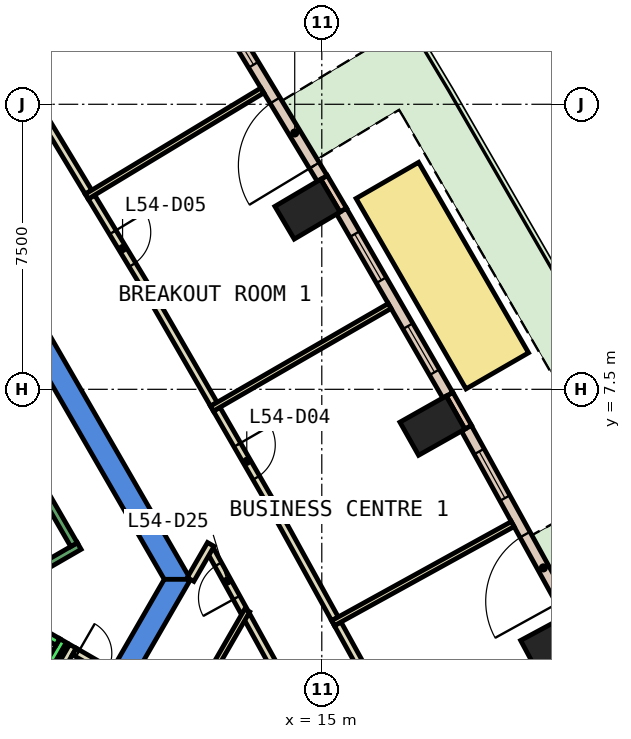
"""IFC4 building model, lengths in metres.
Left out: names, types, materials, properties, quantities, classifications, styles, units other than length and angle.
Written with IfcOpenShell. Run it as: python <this file> out.ifc"""

import sys

from ifc_helpers import new_model, si_unit, direction, frame, frame_2d, origin, origin_2d, place, context, subcontext, project, spatial, polyline, rectangle, outline, extrude, element, fill, save


model = new_model("IFC4")
c1 = context("Model", 3, precision=1e-05, world=origin(), true_north=direction((0.0, 1.0)))
c2 = subcontext(c1, "Body", "Model", "MODEL_VIEW")
j1 = project(units=[si_unit("LENGTHUNIT", "METRE"), si_unit("PLANEANGLEUNIT", "RADIAN")], contexts=[c1])
p1 = place(None, origin())
s1 = spatial("IfcSite", under=j1, at=p1, CompositionType="ELEMENT")
p2 = place(p1, origin())
s2 = spatial("IfcBuilding", under=s1, at=p2, CompositionType="ELEMENT")
p3 = place(p2, frame((0.0, 0.0, 241.4)))
s3 = spatial("IfcBuildingStorey", under=s2, at=p3, CompositionType="ELEMENT", Elevation=241.4)
for number, where, z_axis, x_axis in (
    (1, (21.086, 0.784, 0.0), (0.0, 0.0, 1.0), (-0.474, 0.881, 0.0)),
    (2, (17.911, 6.544, 0.0), (0.0, 0.0, 1.0), (-0.491, 0.871, 0.0)),
    (3, (14.623, 12.239, 0.0), (0.0, 0.0, 1.0), (-0.509, 0.861, 0.0)),
):
    element("IfcColumn", number, at=place(p3, frame(where, z_axis=z_axis, x_axis=x_axis)), inside=s3, PredefinedType="COLUMN", context=c2, shape_type="SweptSolid", body=[
        extrude(rectangle(XDim=1.0, YDim=1.4, at=origin_2d()), origin(), (0.0, 0.0, 1.0), 3.26),
    ])
p4 = place(p3, frame((0.0, 0.0, -0.6)))
e4 = element("IfcWall", 4, at=p4, inside=s3, PredefinedType="SHEAR", context=c2, shape_type="SweptSolid", body=[
    extrude(outline(polyline([(6.786, 10.747), (6.266, 10.447), (10.854, 2.5), (11.547, 2.5), (6.786, 10.747)])), origin(), (0.0, 0.0, 1.0), 3.86),
])
p5 = place(p3, frame((0.0, 0.0, -0.6)))
e5 = element("IfcWall", 5, at=p5, inside=s3, PredefinedType="SHEAR", context=c2, shape_type="SweptSolid", body=[
    extrude(outline(polyline([(5.774, -7.5), (11.547, 2.5), (10.854, 2.5), (5.427, -6.9), (5.774, -7.5)])), origin(), (0.0, 0.0, 1.0), 3.86),
])
p6 = place(p3, frame((18.854, 6.501, 0.0), z_axis=(0.0, 0.0, 1.0), x_axis=(-0.491743606947, 0.87074004446, 0.0)))
e6 = element("IfcWall", 6, at=p6, inside=s3, PredefinedType="STANDARD", context=c2, shape_type="SweptSolid", body=[
    extrude(rectangle(XDim=1.0, YDim=0.2, at=frame_2d((0.5, 0.0))), origin(), (0.0, 0.0, 1.0), 3.26),
])
p7 = place(p3, frame((15.566, 12.216, 0.0), z_axis=(0.0, 0.0, 1.0), x_axis=(-0.508087253435, 0.86130560366, 0.0)))
e7 = element("IfcWall", 7, at=p7, inside=s3, PredefinedType="STANDARD", context=c2, shape_type="SweptSolid", body=[
    extrude(rectangle(XDim=1.0, YDim=0.2, at=frame_2d((0.5, 0.0))), origin(), (0.0, 0.0, 1.0), 3.26),
])
p8 = place(p3, frame((21.505, 1.577, 0.0), z_axis=(0.0, 0.0, 1.0), x_axis=(-0.482734585173, 0.875766704253, 0.0)))
e8 = element("IfcWall", 8, at=p8, inside=s3, PredefinedType="STANDARD", context=c2, shape_type="SweptSolid", body=[
    extrude(rectangle(XDim=5.593, YDim=0.3, at=frame_2d((2.796, 0.0))), origin(), (0.0, 0.0, 1.0), 3.26),
])
p9 = place(p8, frame((0.398, 0.0, 0.0)))
e9 = element("IfcOpeningElement", 9, at=p9, cuts=e8, PredefinedType="OPENING", context=c2, shape_type="SweptSolid", body=[
    extrude(rectangle(XDim=2.0, YDim=2.4, at=frame_2d((1.0, 1.2))), frame((0.0, 0.16, 0.0), z_axis=(0.0, -1.0, 0.0), x_axis=(1.0, 0.0, 0.0)), (0.0, 0.0, 1.0), 0.32),
])
p10 = place(p8, frame((3.495, 0.0, 0.9)))
e10 = element("IfcOpeningElement", 10, at=p10, cuts=e8, PredefinedType="OPENING", context=c2, shape_type="SweptSolid", body=[
    extrude(rectangle(XDim=1.4, YDim=2.0, at=frame_2d((0.7, 1.0))), frame((0.0, 0.16, 0.0), z_axis=(0.0, -1.0, 0.0), x_axis=(1.0, 0.0, 0.0)), (0.0, 0.0, 1.0), 0.32),
])
p11 = place(p3, frame((18.315, 7.344, 0.0), z_axis=(0.0, 0.0, 1.0), x_axis=(-0.49995037644, 0.866054052065, 0.0)))
e11 = element("IfcWall", 11, at=p11, inside=s3, PredefinedType="STANDARD", context=c2, shape_type="SweptSolid", body=[
    extrude(rectangle(XDim=5.594, YDim=0.3, at=frame_2d((2.797, 0.0))), origin(), (0.0, 0.0, 1.0), 3.26),
])
p12 = place(p11, frame((0.699, 0.0, 0.9)))
e12 = element("IfcOpeningElement", 12, at=p12, cuts=e11, PredefinedType="OPENING", context=c2, shape_type="SweptSolid", body=[
    extrude(rectangle(XDim=1.4, YDim=2.0, at=frame_2d((0.7, 1.0))), frame((0.0, 0.16, 0.0), z_axis=(0.0, -1.0, 0.0), x_axis=(1.0, 0.0, 0.0)), (0.0, 0.0, 1.0), 0.32),
])
p13 = place(p11, frame((3.496, 0.0, 0.9)))
e13 = element("IfcOpeningElement", 13, at=p13, cuts=e11, PredefinedType="OPENING", context=c2, shape_type="SweptSolid", body=[
    extrude(rectangle(XDim=1.4, YDim=2.0, at=frame_2d((0.7, 1.0))), frame((0.0, 0.16, 0.0), z_axis=(0.0, -1.0, 0.0), x_axis=(1.0, 0.0, 0.0)), (0.0, 0.0, 1.0), 0.32),
])
p14 = place(p3, frame((15.011, 13.048, 0.0), z_axis=(0.0, 0.0, 1.0), x_axis=(-0.517169592475, 0.855882943293, 0.0)))
e14 = element("IfcWall", 14, at=p14, inside=s3, PredefinedType="STANDARD", context=c2, shape_type="SweptSolid", body=[
    extrude(rectangle(XDim=5.594, YDim=0.3, at=frame_2d((2.797, 0.0))), origin(), (0.0, 0.0, 1.0), 3.26),
])
p15 = place(p14, frame((0.399, 0.0, 0.0)))
e15 = element("IfcOpeningElement", 15, at=p15, cuts=e14, PredefinedType="OPENING", context=c2, shape_type="SweptSolid", body=[
    extrude(rectangle(XDim=2.0, YDim=2.4, at=frame_2d((1.0, 1.2))), frame((0.0, 0.16, 0.0), z_axis=(0.0, -1.0, 0.0), x_axis=(1.0, 0.0, 0.0)), (0.0, 0.0, 1.0), 0.32),
])
p16 = place(p14, frame((3.496, 0.0, 0.9)))
e16 = element("IfcOpeningElement", 16, at=p16, cuts=e14, PredefinedType="OPENING", context=c2, shape_type="SweptSolid", body=[
    extrude(rectangle(XDim=1.4, YDim=2.0, at=frame_2d((0.7, 1.0))), frame((0.0, 0.16, 0.0), z_axis=(0.0, -1.0, 0.0), x_axis=(1.0, 0.0, 0.0)), (0.0, 0.0, 1.0), 0.32),
])
p17 = place(p3, frame((19.618, 7.986, 0.0), z_axis=(0.0, 0.0, 1.0), x_axis=(-0.499964737226, 0.866045761799, 0.0)))
e17 = element("IfcWall", 17, at=p17, inside=s3, PredefinedType="STANDARD", context=c2, shape_type="SweptSolid", body=[
    extrude(rectangle(XDim=5.786, YDim=1.9, at=frame_2d((2.893, 0.0))), origin(), (0.0, 0.0, 1.0), 0.8),
])
p18 = place(p3, frame((12.952, 1.661, 0.0), z_axis=(0.0, 0.0, 1.0), x_axis=(-0.482707835392, 0.875781448566, 0.0)))
e18 = element("IfcWall", 18, at=p18, inside=s3, PredefinedType="PARTITIONING", context=c2, shape_type="SweptSolid", body=[
    extrude(rectangle(XDim=1.817, YDim=0.2, at=frame_2d((0.908, 0.0))), origin(), (0.0, 0.0, 1.0), 3.26),
])
p19 = place(p18, frame((0.408, 0.0, 0.0)))
e19 = element("IfcOpeningElement", 19, at=p19, cuts=e18, PredefinedType="OPENING", context=c2, shape_type="SweptSolid", body=[
    extrude(rectangle(XDim=1.0, YDim=2.1, at=frame_2d((0.5, 1.05))), frame((0.0, 0.11, 0.0), z_axis=(0.0, -1.0, 0.0), x_axis=(1.0, 0.0, 0.0)), (0.0, 0.0, 1.0), 0.22),
])
p20 = place(p3, frame((12.079, 3.419, 0.0), z_axis=(0.0, 0.0, 1.0), x_axis=(-0.500674759037, -0.865635480825, 0.0)))
e20 = element("IfcWall", 20, at=p20, inside=s3, PredefinedType="PARTITIONING", context=c2, shape_type="SweptSolid", body=[
    extrude(rectangle(XDim=1.065, YDim=0.2, at=frame_2d((0.532, 0.0))), origin(), (0.0, 0.0, 1.0), 3.26),
])
p21 = place(p3, frame((15.186, -2.391, 0.0), z_axis=(0.0, 0.0, 1.0), x_axis=(-0.482858240592, 0.875698532311, 0.0)))
e21 = element("IfcWall", 21, at=p21, inside=s3, PredefinedType="PARTITIONING", context=c2, shape_type="SweptSolid", body=[
    extrude(rectangle(XDim=4.478, YDim=0.2, at=frame_2d((2.239, 0.0))), origin(), (0.0, 0.0, 1.0), 3.26),
])
p22 = place(p21, frame((1.739, 0.0, 0.0)))
e22 = element("IfcOpeningElement", 22, at=p22, cuts=e21, PredefinedType="OPENING", context=c2, shape_type="SweptSolid", body=[
    extrude(rectangle(XDim=1.0, YDim=2.1, at=frame_2d((0.5, 1.05))), frame((0.0, 0.11, 0.0), z_axis=(0.0, -1.0, 0.0), x_axis=(1.0, 0.0, 0.0)), (0.0, 0.0, 1.0), 0.22),
])
p23 = place(p3, frame((15.418, 1.33, 0.0), z_axis=(0.0, 0.0, 1.0), x_axis=(0.482838875149, -0.875709210095, 0.0)))
e23 = element("IfcWall", 23, at=p23, inside=s3, PredefinedType="PARTITIONING", context=c2, shape_type="SweptSolid", body=[
    extrude(rectangle(XDim=3.167, YDim=0.2, at=frame_2d((1.583, 0.0))), origin(), (0.0, 0.0, 1.0), 3.26),
])
p24 = place(p3, frame((12.234, 6.977, 0.0), z_axis=(0.0, 0.0, 1.0), x_axis=(0.499820325382, -0.866129114125, 0.0)))
e24 = element("IfcWall", 24, at=p24, inside=s3, PredefinedType="PARTITIONING", context=c2, shape_type="SweptSolid", body=[
    extrude(rectangle(XDim=3.167, YDim=0.2, at=frame_2d((1.583, 0.0))), origin(), (0.0, 0.0, 1.0), 3.26),
])
p25 = place(p24, frame((1.084, 0.0, 0.0)))
e25 = element("IfcOpeningElement", 25, at=p25, cuts=e24, PredefinedType="OPENING", context=c2, shape_type="SweptSolid", body=[
    extrude(rectangle(XDim=1.0, YDim=2.1, at=frame_2d((0.5, 1.05))), frame((0.0, 0.11, 0.0), z_axis=(0.0, -1.0, 0.0), x_axis=(1.0, 0.0, 0.0)), (0.0, 0.0, 1.0), 0.22),
])
p26 = place(p3, frame((13.817, 4.234, 0.0), z_axis=(0.0, 0.0, 1.0), x_axis=(0.482871474341, -0.875691235121, 0.0)))
e26 = element("IfcWall", 26, at=p26, inside=s3, PredefinedType="PARTITIONING", context=c2, shape_type="SweptSolid", body=[
    extrude(rectangle(XDim=3.167, YDim=0.2, at=frame_2d((1.583, 0.0))), origin(), (0.0, 0.0, 1.0), 3.26),
])
p27 = place(p3, frame((8.939, 12.559, 0.0), z_axis=(0.0, 0.0, 1.0), x_axis=(0.517045022441, -0.855958202699, 0.0)))
e27 = element("IfcWall", 27, at=p27, inside=s3, PredefinedType="PARTITIONING", context=c2, shape_type="SweptSolid", body=[
    extrude(rectangle(XDim=3.166, YDim=0.2, at=frame_2d((1.583, 0.0))), origin(), (0.0, 0.0, 1.0), 3.26),
])
p28 = place(p27, frame((1.083, 0.0, 0.0)))
e28 = element("IfcOpeningElement", 28, at=p28, cuts=e27, PredefinedType="OPENING", context=c2, shape_type="SweptSolid", body=[
    extrude(rectangle(XDim=1.0, YDim=2.1, at=frame_2d((0.5, 1.05))), frame((0.0, 0.11, 0.0), z_axis=(0.0, -1.0, 0.0), x_axis=(1.0, 0.0, 0.0)), (0.0, 0.0, 1.0), 0.22),
])
p29 = place(p3, frame((10.576, 9.849, 0.0), z_axis=(0.0, 0.0, 1.0), x_axis=(0.499953838557, -0.866052053466, 0.0)))
e29 = element("IfcWall", 29, at=p29, inside=s3, PredefinedType="PARTITIONING", context=c2, shape_type="SweptSolid", body=[
    extrude(rectangle(XDim=3.166, YDim=0.2, at=frame_2d((1.583, 0.0))), origin(), (0.0, 0.0, 1.0), 3.26),
])
p30 = place(p3, frame((7.224, 15.399, 0.0), z_axis=(0.0, 0.0, 1.0), x_axis=(0.51690854001, -0.856040630615, 0.0)))
e30 = element("IfcWall", 30, at=p30, inside=s3, PredefinedType="PARTITIONING", context=c2, shape_type="SweptSolid", body=[
    extrude(rectangle(XDim=3.167, YDim=0.2, at=frame_2d((1.583, 0.0))), origin(), (0.0, 0.0, 1.0), 3.26),
])
p31 = place(p3, frame((5.751, -3.938, 0.0), z_axis=(0.0, 0.0, 1.0), x_axis=(0.500034260056, 0.866005622828, 0.0)))
e31 = element("IfcWall", 31, at=p31, inside=s3, PredefinedType="PARTITIONING", context=c2, shape_type="SweptSolid", body=[
    extrude(rectangle(XDim=5.399, YDim=0.2, at=frame_2d((2.7, 0.0))), origin(), (0.0, 0.0, 1.0), 3.26),
])
p32 = place(p3, frame((8.488, 0.602, 0.0), z_axis=(0.0, 0.0, 1.0), x_axis=(0.866063652425, -0.499933745558, 0.0)))
e32 = element("IfcWall", 32, at=p32, inside=s3, PredefinedType="PARTITIONING", context=c2, shape_type="SweptSolid", body=[
    extrude(rectangle(XDim=1.1, YDim=0.2, at=frame_2d((0.55, 0.0))), origin(), (0.0, 0.0, 1.0), 3.26),
])
p33 = place(p32, frame((0.1, 0.0, 0.0)))
e33 = element("IfcOpeningElement", 33, at=p33, cuts=e32, PredefinedType="OPENING", context=c2, shape_type="SweptSolid", body=[
    extrude(rectangle(XDim=0.9, YDim=2.1, at=frame_2d((0.45, 1.05))), frame((0.0, 0.11, 0.0), z_axis=(0.0, -1.0, 0.0), x_axis=(1.0, 0.0, 0.0)), (0.0, 0.0, 1.0), 0.22),
])
p34 = place(p3, frame((9.358, -4.692, 0.0), z_axis=(0.0, 0.0, 1.0), x_axis=(0.500027777314, 0.866009365951, 0.0)))
e34 = element("IfcWall", 34, at=p34, inside=s3, PredefinedType="PARTITIONING", context=c2, shape_type="SweptSolid", body=[
    extrude(rectangle(XDim=7.36, YDim=0.15, at=frame_2d((3.68, 0.0))), origin(), (0.0, 0.0, 1.0), 3.26),
])
p35 = place(p3, frame((15.295, 1.347, 0.0), z_axis=(0.0, 0.0, 1.0), x_axis=(0.875728645362, 0.482803624358, 0.0)))
e35 = element("IfcWall", 35, at=p35, inside=s3, PredefinedType="PARTITIONING", context=c2, shape_type="SweptSolid", body=[
    extrude(rectangle(XDim=5.4, YDim=0.15, at=frame_2d((2.7, 0.0))), origin(), (0.0, 0.0, 1.0), 3.26),
])
p36 = place(p3, frame((12.11, 6.992, 0.0), z_axis=(0.0, 0.0, 1.0), x_axis=(0.865994316829, 0.50005384032, 0.0)))
e36 = element("IfcWall", 36, at=p36, inside=s3, PredefinedType="PARTITIONING", context=c2, shape_type="SweptSolid", body=[
    extrude(rectangle(XDim=5.399, YDim=0.15, at=frame_2d((2.7, 0.0))), origin(), (0.0, 0.0, 1.0), 3.26),
])
p37 = place(p3, frame((8.814, 12.572, 0.0), z_axis=(0.0, 0.0, 1.0), x_axis=(0.855957229262, 0.517046633945, 0.0)))
e37 = element("IfcWall", 37, at=p37, inside=s3, PredefinedType="PARTITIONING", context=c2, shape_type="SweptSolid", body=[
    extrude(rectangle(XDim=5.4, YDim=0.15, at=frame_2d((2.7, 0.0))), origin(), (0.0, 0.0, 1.0), 3.26),
])
p38 = place(p3, frame((5.492, -3.788, 0.0), z_axis=(0.0, 0.0, 1.0), x_axis=(0.500034260056, 0.866005622828, 0.0)))
e38 = element("IfcWall", 38, at=p38, inside=s3, PredefinedType="STANDARD", context=c2, shape_type="SweptSolid", body=[
    extrude(rectangle(XDim=5.399, YDim=0.2, at=frame_2d((2.7, 0.0))), origin(), (0.0, 0.0, 1.0), 3.26),
])
p39 = place(p3, frame((5.977, 2.052, 0.0), z_axis=(0.0, 0.0, 1.0), x_axis=(0.865973769406, -0.500089422704, 0.0)))
e39 = element("IfcWall", 39, at=p39, inside=s3, PredefinedType="STANDARD", context=c2, shape_type="SweptSolid", body=[
    extrude(rectangle(XDim=2.399, YDim=0.2, at=frame_2d((1.2, 0.0))), origin(), (0.0, 0.0, 1.0), 3.26),
])
p40 = place(p3, frame((4.806, 1.176, 0.0), z_axis=(0.0, 0.0, 1.0), x_axis=(0.866059941101, 0.499940174841, 0.0)))
e40 = element("IfcWall", 40, at=p40, inside=s3, PredefinedType="STANDARD", context=c2, shape_type="SweptSolid", body=[
    extrude(rectangle(XDim=4.4, YDim=0.2, at=frame_2d((2.2, 0.0))), origin(), (0.0, 0.0, 1.0), 3.26),
])
p41 = place(p40, frame((2.4, 0.0, 0.0)))
e41 = element("IfcOpeningElement", 41, at=p41, cuts=e40, PredefinedType="OPENING", context=c2, shape_type="SweptSolid", body=[
    extrude(rectangle(XDim=1.1, YDim=2.2, at=frame_2d((0.55, 1.1))), frame((0.0, 0.11, 0.0), z_axis=(0.0, -1.0, 0.0), x_axis=(1.0, 0.0, 0.0)), (0.0, 0.0, 1.0), 0.22),
])
p42 = place(p3, frame((8.48, 3.412, 0.0), z_axis=(0.0, 0.0, 1.0), x_axis=(-0.499978703459, 0.866037698999, 0.0)))
e42 = element("IfcWall", 42, at=p42, inside=s3, PredefinedType="STANDARD", context=c2, shape_type="SweptSolid", body=[
    extrude(rectangle(XDim=6.9, YDim=0.2, at=frame_2d((3.45, 0.0))), origin(), (0.0, 0.0, 1.0), 3.26),
])
p43 = place(p9, origin())
e43 = element("IfcDoor", 43, at=p43, inside=s3, OperationType="SLIDING_TO_LEFT", PredefinedType="DOOR", context=c2, shape_type="SweptSolid", body=[
    extrude(rectangle(XDim=2.0, YDim=2.4, at=frame_2d((1.0, 1.2))), frame((0.0, 0.025, 0.0), z_axis=(0.0, -1.0, 0.0), x_axis=(1.0, 0.0, 0.0)), (0.0, 0.0, 1.0), 0.05),
])
fill(e9, e43)
p44 = place(p10, origin())
e44 = element("IfcWindow", 44, at=p44, inside=s3, PartitioningType="SINGLE_PANEL", PredefinedType="WINDOW", context=c2, shape_type="SweptSolid", body=[
    extrude(rectangle(XDim=1.4, YDim=2.0, at=frame_2d((0.7, 1.0))), frame((0.0, 0.03, 0.0), z_axis=(0.0, -1.0, 0.0), x_axis=(1.0, 0.0, 0.0)), (0.0, 0.0, 1.0), 0.06),
])
fill(e10, e44)
p45 = place(p12, origin())
e45 = element("IfcWindow", 45, at=p45, inside=s3, PartitioningType="SINGLE_PANEL", PredefinedType="WINDOW", context=c2, shape_type="SweptSolid", body=[
    extrude(rectangle(XDim=1.4, YDim=2.0, at=frame_2d((0.7, 1.0))), frame((0.0, 0.03, 0.0), z_axis=(0.0, -1.0, 0.0), x_axis=(1.0, 0.0, 0.0)), (0.0, 0.0, 1.0), 0.06),
])
fill(e12, e45)
p46 = place(p13, origin())
e46 = element("IfcWindow", 46, at=p46, inside=s3, PartitioningType="SINGLE_PANEL", PredefinedType="WINDOW", context=c2, shape_type="SweptSolid", body=[
    extrude(rectangle(XDim=1.4, YDim=2.0, at=frame_2d((0.7, 1.0))), frame((0.0, 0.03, 0.0), z_axis=(0.0, -1.0, 0.0), x_axis=(1.0, 0.0, 0.0)), (0.0, 0.0, 1.0), 0.06),
])
fill(e13, e46)
p47 = place(p15, origin())
e47 = element("IfcDoor", 47, at=p47, inside=s3, OperationType="SLIDING_TO_LEFT", PredefinedType="DOOR", context=c2, shape_type="SweptSolid", body=[
    extrude(rectangle(XDim=2.0, YDim=2.4, at=frame_2d((1.0, 1.2))), frame((0.0, 0.025, 0.0), z_axis=(0.0, -1.0, 0.0), x_axis=(1.0, 0.0, 0.0)), (0.0, 0.0, 1.0), 0.05),
])
fill(e15, e47)
p48 = place(p16, origin())
e48 = element("IfcWindow", 48, at=p48, inside=s3, PartitioningType="SINGLE_PANEL", PredefinedType="WINDOW", context=c2, shape_type="SweptSolid", body=[
    extrude(rectangle(XDim=1.4, YDim=2.0, at=frame_2d((0.7, 1.0))), frame((0.0, 0.03, 0.0), z_axis=(0.0, -1.0, 0.0), x_axis=(1.0, 0.0, 0.0)), (0.0, 0.0, 1.0), 0.06),
])
fill(e16, e48)
p49 = place(p25, origin())
e49 = element("IfcDoor", 49, at=p49, inside=s3, OperationType="SINGLE_SWING_LEFT", PredefinedType="DOOR", context=c2, shape_type="SweptSolid", body=[
    extrude(rectangle(XDim=1.0, YDim=2.1, at=frame_2d((0.5, 1.05))), frame((0.0, 0.025, 0.0), z_axis=(0.0, -1.0, 0.0), x_axis=(1.0, 0.0, 0.0)), (0.0, 0.0, 1.0), 0.05),
])
fill(e25, e49)
p50 = place(p28, origin())
e50 = element("IfcDoor", 50, at=p50, inside=s3, OperationType="SINGLE_SWING_LEFT", PredefinedType="DOOR", context=c2, shape_type="SweptSolid", body=[
    extrude(rectangle(XDim=1.0, YDim=2.1, at=frame_2d((0.5, 1.05))), frame((0.0, 0.025, 0.0), z_axis=(0.0, -1.0, 0.0), x_axis=(1.0, 0.0, 0.0)), (0.0, 0.0, 1.0), 0.05),
])
fill(e28, e50)
p51 = place(p19, origin())
e51 = element("IfcDoor", 51, at=p51, inside=s3, OperationType="SINGLE_SWING_RIGHT", PredefinedType="DOOR", context=c2, shape_type="SweptSolid", body=[
    extrude(rectangle(XDim=1.0, YDim=2.1, at=frame_2d((0.5, 1.05))), frame((0.0, 0.025, 0.0), z_axis=(0.0, -1.0, 0.0), x_axis=(1.0, 0.0, 0.0)), (0.0, 0.0, 1.0), 0.05),
])
fill(e19, e51)
p52 = place(p33, origin())
e52 = element("IfcDoor", 52, at=p52, inside=s3, OperationType="SINGLE_SWING_RIGHT", PredefinedType="DOOR", context=c2, shape_type="SweptSolid", body=[
    extrude(rectangle(XDim=0.9, YDim=2.1, at=frame_2d((0.45, 1.05))), frame((0.0, 0.025, 0.0), z_axis=(0.0, -1.0, 0.0), x_axis=(1.0, 0.0, 0.0)), (0.0, 0.0, 1.0), 0.05),
])
fill(e33, e52)
save(model, sys.argv[1])
